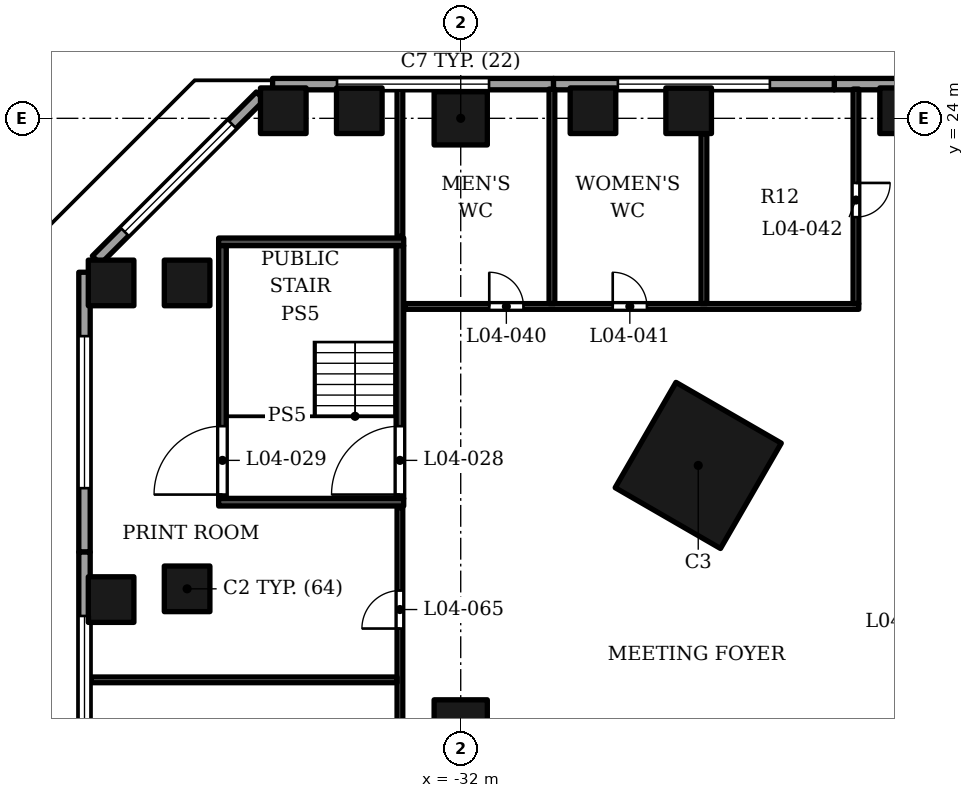
"""IFC4 building model, lengths in metres.
Left out: names, types, materials, properties, quantities, classifications, styles, units other than length and angle.
Written with IfcOpenShell. Run it as: python <this file> out.ifc"""

import sys

from ifc_helpers import new_model, si_unit, direction, frame, frame_2d, origin, origin_2d, place, context, subcontext, project, spatial, rectangle, extrude, element, fill, save


model = new_model("IFC4")
c1 = context("Model", 3, precision=1e-05, world=origin(), true_north=direction((0.0, 1.0)))
c2 = subcontext(c1, "Body", "Model", "MODEL_VIEW")
j1 = project(units=[si_unit("LENGTHUNIT", "METRE"), si_unit("PLANEANGLEUNIT", "RADIAN")], contexts=[c1])
p1 = place(None, origin())
s1 = spatial("IfcSite", under=j1, at=p1, CompositionType="ELEMENT")
p2 = place(p1, origin())
s2 = spatial("IfcBuilding", under=s1, at=p2, CompositionType="ELEMENT")
p3 = place(p2, frame((0.0, 0.0, 34.5)))
s3 = spatial("IfcBuildingStorey", under=s2, at=p3, CompositionType="ELEMENT", Elevation=34.5)
for number, where, z_axis, x_axis in (
    (1, (-32.0, 8.0, 0.0), (0.0, 0.0, 1.0), (1.0, 0.0, 0.0)),
    (2, (-32.0, 24.0, 0.0), (0.0, 0.0, 1.0), (1.0, 0.0, 0.0)),
):
    element("IfcColumn", number, at=place(p3, frame(where, z_axis=z_axis, x_axis=x_axis)), inside=s3, PredefinedType="COLUMN", context=c2, shape_type="SweptSolid", body=[
        extrude(rectangle(XDim=1.4, YDim=1.4, at=origin_2d()), origin(), (0.0, 0.0, 1.0), 5.5),
    ])
for number, where, z_axis, x_axis in (
    (3, (-39.2, 19.669, 0.0), (0.0, 0.0, 1.0), (1.0, 0.0, 0.0)),
    (4, (-34.669, 24.2, 0.0), (0.0, 0.0, 1.0), (1.0, 0.0, 0.0)),
    (5, (-39.2, 11.62, 0.0), (0.0, 0.0, 1.0), (1.0, 0.0, 0.0)),
    (6, (-26.002, 24.2, 0.0), (0.0, 0.0, 1.0), (1.0, 0.0, 0.0)),
    (7, (-41.2, 19.669, 0.0), (0.0, 0.0, 1.0), (1.0, 0.0, 0.0)),
    (8, (-36.669, 24.2, 0.0), (0.0, 0.0, 1.0), (1.0, 0.0, 0.0)),
    (9, (-41.2, 11.337, 0.0), (0.0, 0.0, 1.0), (1.0, 0.0, 0.0)),
    (10, (-28.52, 24.2, 0.0), (0.0, 0.0, 1.0), (1.0, 0.0, 0.0)),
    (11, (-20.372, 24.2, 0.0), (0.0, 0.0, 1.0), (1.0, 0.0, 0.0)),
):
    element("IfcColumn", number, at=place(p3, frame(where, z_axis=z_axis, x_axis=x_axis)), inside=s3, PredefinedType="COLUMN", context=c2, shape_type="SweptSolid", body=[
        extrude(rectangle(XDim=1.2, YDim=1.2, at=origin_2d()), origin(), (0.0, 0.0, 1.0), 5.5),
    ])
p4 = place(p3, frame((-25.75, 14.867, 0.0), z_axis=(0.0, 0.0, 1.0), x_axis=(0.866025386331, -0.50000003023, 0.0)))
e12 = element("IfcColumn", 12, at=p4, inside=s3, PredefinedType="COLUMN", context=c2, shape_type="SweptSolid", body=[
    extrude(rectangle(XDim=3.2, YDim=3.2, at=origin_2d()), origin(), (0.0, 0.0, 1.0), 5.5),
])
p5 = place(p3, frame((-14.78, 24.9, 0.0), z_axis=(0.0, 0.0, 1.0), x_axis=(-1.0, 0.0, 0.0)))
e13 = element("IfcWall", 13, at=p5, inside=s3, PredefinedType="SOLIDWALL", context=c2, shape_type="SweptSolid", body=[
    extrude(rectangle(XDim=7.39, YDim=0.3, at=frame_2d((3.695, 0.0))), origin(), (0.0, 0.0, 1.0), 4.1),
])
p6 = place(p5, frame((1.695, 0.0, 1.0)))
e14 = element("IfcOpeningElement", 14, at=p6, cuts=e13, PredefinedType="OPENING", context=c2, shape_type="SweptSolid", body=[
    extrude(rectangle(XDim=4.0, YDim=1.8, at=frame_2d((2.0, 0.9))), frame((0.0, 0.16, 0.0), z_axis=(0.0, -1.0, 0.0), x_axis=(1.0, 0.0, 0.0)), (0.0, 0.0, 1.0), 0.32),
])
p7 = place(p3, frame((-22.17, 24.9, 0.0), z_axis=(0.0, 0.0, 1.0), x_axis=(-1.0, 0.0, 0.0)))
e15 = element("IfcWall", 15, at=p7, inside=s3, PredefinedType="SOLIDWALL", context=c2, shape_type="SweptSolid", body=[
    extrude(rectangle(XDim=7.39, YDim=0.3, at=frame_2d((3.695, 0.0))), origin(), (0.0, 0.0, 1.0), 4.1),
])
p8 = place(p7, frame((1.695, 0.0, 1.0)))
e16 = element("IfcOpeningElement", 16, at=p8, cuts=e15, PredefinedType="OPENING", context=c2, shape_type="SweptSolid", body=[
    extrude(rectangle(XDim=4.0, YDim=1.8, at=frame_2d((2.0, 0.9))), frame((0.0, 0.16, 0.0), z_axis=(0.0, -1.0, 0.0), x_axis=(1.0, 0.0, 0.0)), (0.0, 0.0, 1.0), 0.32),
])
p9 = place(p3, frame((-29.56, 24.9, 0.0), z_axis=(0.0, 0.0, 1.0), x_axis=(-1.0, 0.0, 0.0)))
e17 = element("IfcWall", 17, at=p9, inside=s3, PredefinedType="SOLIDWALL", context=c2, shape_type="SweptSolid", body=[
    extrude(rectangle(XDim=7.39, YDim=0.3, at=frame_2d((3.695, 0.0))), origin(), (0.0, 0.0, 1.0), 4.1),
])
p10 = place(p9, frame((1.695, 0.0, 1.0)))
e18 = element("IfcOpeningElement", 18, at=p10, cuts=e17, PredefinedType="OPENING", context=c2, shape_type="SweptSolid", body=[
    extrude(rectangle(XDim=4.0, YDim=1.8, at=frame_2d((2.0, 0.9))), frame((0.0, 0.16, 0.0), z_axis=(0.0, -1.0, 0.0), x_axis=(1.0, 0.0, 0.0)), (0.0, 0.0, 1.0), 0.32),
])
p11 = place(p3, frame((-37.271, 24.588, 0.0), z_axis=(0.0, 0.0, 1.0), x_axis=(-0.707106781187, -0.707106781187, 0.0)))
e19 = element("IfcWall", 19, at=p11, inside=s3, PredefinedType="SOLIDWALL", context=c2, shape_type="SweptSolid", body=[
    extrude(rectangle(XDim=6.105, YDim=0.3, at=frame_2d((3.052, 0.0))), origin(), (0.0, 0.0, 1.0), 4.1),
])
p12 = place(p11, frame((1.052, 0.0, 1.0)))
e20 = element("IfcOpeningElement", 20, at=p12, cuts=e19, PredefinedType="OPENING", context=c2, shape_type="SweptSolid", body=[
    extrude(rectangle(XDim=4.0, YDim=1.8, at=frame_2d((2.0, 0.9))), frame((0.0, 0.16, 0.0), z_axis=(0.0, -1.0, 0.0), x_axis=(1.0, 0.0, 0.0)), (0.0, 0.0, 1.0), 0.32),
])
p13 = place(p3, frame((-41.9, 19.95, 0.0), z_axis=(0.0, 0.0, 1.0), x_axis=(0.0, -1.0, 0.0)))
e21 = element("IfcWall", 21, at=p13, inside=s3, PredefinedType="SOLIDWALL", context=c2, shape_type="SweptSolid", body=[
    extrude(rectangle(XDim=7.363, YDim=0.3, at=frame_2d((3.681, 0.0))), origin(), (0.0, 0.0, 1.0), 4.1),
])
p14 = place(p13, frame((1.681, 0.0, 1.0)))
e22 = element("IfcOpeningElement", 22, at=p14, cuts=e21, PredefinedType="OPENING", context=c2, shape_type="SweptSolid", body=[
    extrude(rectangle(XDim=4.0, YDim=1.8, at=frame_2d((2.0, 0.9))), frame((0.0, 0.16, 0.0), z_axis=(0.0, -1.0, 0.0), x_axis=(1.0, 0.0, 0.0)), (0.0, 0.0, 1.0), 0.32),
])
p15 = place(p3, frame((-41.9, 12.587, 0.0), z_axis=(0.0, 0.0, 1.0), x_axis=(0.0, -1.0, 0.0)))
e23 = element("IfcWall", 23, at=p15, inside=s3, PredefinedType="SOLIDWALL", context=c2, shape_type="SweptSolid", body=[
    extrude(rectangle(XDim=7.362, YDim=0.3, at=frame_2d((3.681, 0.0))), origin(), (0.0, 0.0, 1.0), 4.1),
])
p16 = place(p15, frame((1.681, 0.0, 1.0)))
e24 = element("IfcOpeningElement", 24, at=p16, cuts=e23, PredefinedType="OPENING", context=c2, shape_type="SweptSolid", body=[
    extrude(rectangle(XDim=4.0, YDim=1.8, at=frame_2d((2.0, 0.9))), frame((0.0, 0.16, 0.0), z_axis=(0.0, -1.0, 0.0), x_axis=(1.0, 0.0, 0.0)), (0.0, 0.0, 1.0), 0.32),
])
p17 = place(p3, frame((-35.75, 24.85, 5.5), z_axis=(0.0, 0.0, 1.0), x_axis=(-1.0, 0.0, 0.0)))
e25 = element("IfcWall", 25, at=p17, inside=s3, PredefinedType="PARAPET", context=c2, shape_type="SweptSolid", body=[
    extrude(rectangle(XDim=1.25, YDim=0.3, at=frame_2d((0.625, 0.0))), origin(), (0.0, 0.0, 1.0), 1.1),
])
p18 = place(p3, frame((-37.042, 24.745, 5.5), z_axis=(0.0, 0.0, 1.0), x_axis=(-0.707124572946, -0.70708898898, 0.0)))
e26 = element("IfcWall", 26, at=p18, inside=s3, PredefinedType="PARAPET", context=c2, shape_type="SweptSolid", body=[
    extrude(rectangle(XDim=6.861, YDim=0.3, at=frame_2d((3.431, 0.0))), origin(), (0.0, 0.0, 1.0), 1.1),
])
p19 = place(p3, frame((-41.85, 19.79, 5.5), z_axis=(0.0, 0.0, 1.0), x_axis=(0.0, -1.0, 0.0)))
e27 = element("IfcWall", 27, at=p19, inside=s3, PredefinedType="PARAPET", context=c2, shape_type="SweptSolid", body=[
    extrude(rectangle(XDim=14.698, YDim=0.3, at=frame_2d((7.349, 0.0))), origin(), (0.0, 0.0, 1.0), 1.1),
])
for number, where, z_axis, x_axis in (
    (28, (-38.37, 13.9, 0.0), (0.0, 0.0, 1.0), (1.0, 0.0, 0.0)),
    (29, (-38.37, 20.75, 0.0), (0.0, 0.0, 1.0), (1.0, 0.0, 0.0)),
):
    element("IfcWall", number, at=place(p3, frame(where, z_axis=z_axis, x_axis=x_axis)), inside=s3, PredefinedType="SOLIDWALL", context=c2, shape_type="SweptSolid", body=[
        extrude(rectangle(XDim=4.87, YDim=0.2, at=frame_2d((2.435, 0.0))), origin(), (0.0, 0.0, 1.0), 5.05),
    ])
p20 = place(p3, frame((-38.27, 14.0, 0.0), z_axis=(0.0, 0.0, 1.0), x_axis=(0.0, 1.0, 0.0)))
e30 = element("IfcWall", 30, at=p20, inside=s3, PredefinedType="SOLIDWALL", context=c2, shape_type="SweptSolid", body=[
    extrude(rectangle(XDim=6.65, YDim=0.2, at=frame_2d((3.325, 0.0))), origin(), (0.0, 0.0, 1.0), 5.05),
])
p21 = place(p20, frame((0.1, 0.0, 0.0)))
e31 = element("IfcOpeningElement", 31, at=p21, cuts=e30, PredefinedType="OPENING", context=c2, shape_type="SweptSolid", body=[
    extrude(rectangle(XDim=1.8, YDim=2.4, at=frame_2d((0.9, 1.2))), frame((0.0, 0.11, 0.0), z_axis=(0.0, -1.0, 0.0), x_axis=(1.0, 0.0, 0.0)), (0.0, 0.0, 1.0), 0.22),
])
p22 = place(p3, frame((-33.6, 14.0, 0.0), z_axis=(0.0, 0.0, 1.0), x_axis=(0.0, 1.0, 0.0)))
e32 = element("IfcWall", 32, at=p22, inside=s3, PredefinedType="SOLIDWALL", context=c2, shape_type="SweptSolid", body=[
    extrude(rectangle(XDim=6.65, YDim=0.2, at=frame_2d((3.325, 0.0))), origin(), (0.0, 0.0, 1.0), 5.05),
])
p23 = place(p22, frame((0.1, 0.0, 0.0)))
e33 = element("IfcOpeningElement", 33, at=p23, cuts=e32, PredefinedType="OPENING", context=c2, shape_type="SweptSolid", body=[
    extrude(rectangle(XDim=1.8, YDim=2.4, at=frame_2d((0.9, 1.2))), frame((0.0, 0.11, 0.0), z_axis=(0.0, -1.0, 0.0), x_axis=(1.0, 0.0, 0.0)), (0.0, 0.0, 1.0), 0.22),
])
p24 = place(p3, frame((-33.6, 4.69, 0.0), z_axis=(0.0, 0.0, 1.0), x_axis=(0.0, 1.0, 0.0)))
e34 = element("IfcWall", 34, at=p24, inside=s3, PredefinedType="PARTITIONING", context=c2, shape_type="SweptSolid", body=[
    extrude(rectangle(XDim=9.07, YDim=0.15, at=frame_2d((4.535, 0.0))), origin(), (0.0, 0.0, 1.0), 3.85),
])
p25 = place(p24, frame((0.261, 0.0, 0.0)))
e35 = element("IfcOpeningElement", 35, at=p25, cuts=e34, PredefinedType="OPENING", context=c2, shape_type="SweptSolid", body=[
    extrude(rectangle(XDim=1.0, YDim=2.1, at=frame_2d((0.5, 1.05))), frame((0.0, 0.085, 0.0), z_axis=(0.0, -1.0, 0.0), x_axis=(1.0, 0.0, 0.0)), (0.0, 0.0, 1.0), 0.17),
])
p26 = place(p24, frame((5.885, 0.0, 0.0)))
e36 = element("IfcOpeningElement", 36, at=p26, cuts=e34, PredefinedType="OPENING", context=c2, shape_type="SweptSolid", body=[
    extrude(rectangle(XDim=1.0, YDim=2.1, at=frame_2d((0.5, 1.05))), frame((0.0, 0.085, 0.0), z_axis=(0.0, -1.0, 0.0), x_axis=(1.0, 0.0, 0.0)), (0.0, 0.0, 1.0), 0.17),
])
p27 = place(p3, frame((-41.72, 9.225, 0.0), z_axis=(0.0, 0.0, 1.0), x_axis=(1.0, 0.0, 0.0)))
e37 = element("IfcWall", 37, at=p27, inside=s3, PredefinedType="PARTITIONING", context=c2, shape_type="SweptSolid", body=[
    extrude(rectangle(XDim=8.045, YDim=0.15, at=frame_2d((4.022, 0.0))), origin(), (0.0, 0.0, 1.0), 4.15),
])
p28 = place(p3, frame((-33.46, 19.05, 0.0), z_axis=(0.0, 0.0, 1.0), x_axis=(1.0, 0.0, 0.0)))
e38 = element("IfcWall", 38, at=p28, inside=s3, PredefinedType="PARTITIONING", context=c2, shape_type="SweptSolid", body=[
    extrude(rectangle(XDim=11.935, YDim=0.15, at=frame_2d((5.968, 0.0))), origin(), (0.0, 0.0, 1.0), 3.85),
])
p29 = place(p28, frame((2.211, 0.0, 0.0)))
e39 = element("IfcOpeningElement", 39, at=p29, cuts=e38, PredefinedType="OPENING", context=c2, shape_type="SweptSolid", body=[
    extrude(rectangle(XDim=0.9, YDim=2.1, at=frame_2d((0.45, 1.05))), frame((0.0, 0.085, 0.0), z_axis=(0.0, -1.0, 0.0), x_axis=(1.0, 0.0, 0.0)), (0.0, 0.0, 1.0), 0.17),
])
p30 = place(p28, frame((5.46, 0.0, 0.0)))
e40 = element("IfcOpeningElement", 40, at=p30, cuts=e38, PredefinedType="OPENING", context=c2, shape_type="SweptSolid", body=[
    extrude(rectangle(XDim=0.9, YDim=2.1, at=frame_2d((0.45, 1.05))), frame((0.0, 0.085, 0.0), z_axis=(0.0, -1.0, 0.0), x_axis=(1.0, 0.0, 0.0)), (0.0, 0.0, 1.0), 0.17),
])
p31 = place(p3, frame((-29.6, 19.125, 0.0), z_axis=(0.0, 0.0, 1.0), x_axis=(0.0, 1.0, 0.0)))
e41 = element("IfcWall", 41, at=p31, inside=s3, PredefinedType="PARTITIONING", context=c2, shape_type="SweptSolid", body=[
    extrude(rectangle(XDim=5.645, YDim=0.15, at=frame_2d((2.823, 0.0))), origin(), (0.0, 0.0, 1.0), 3.85),
])
p32 = place(p3, frame((-25.6, 19.125, 0.0), z_axis=(0.0, 0.0, 1.0), x_axis=(0.0, 1.0, 0.0)))
e42 = element("IfcWall", 42, at=p32, inside=s3, PredefinedType="PARTITIONING", context=c2, shape_type="SweptSolid", body=[
    extrude(rectangle(XDim=4.475, YDim=0.15, at=frame_2d((2.238, 0.0))), origin(), (0.0, 0.0, 1.0), 5.05),
])
p33 = place(p3, frame((-21.6, 19.125, 0.0), z_axis=(0.0, 0.0, 1.0), x_axis=(0.0, 1.0, 0.0)))
e43 = element("IfcWall", 43, at=p33, inside=s3, PredefinedType="PARTITIONING", context=c2, shape_type="SweptSolid", body=[
    extrude(rectangle(XDim=5.645, YDim=0.15, at=frame_2d((2.823, 0.0))), origin(), (0.0, 0.0, 1.0), 3.85),
])
p34 = place(p33, frame((2.275, 0.0, 0.0)))
e44 = element("IfcOpeningElement", 44, at=p34, cuts=e43, PredefinedType="OPENING", context=c2, shape_type="SweptSolid", body=[
    extrude(rectangle(XDim=0.9, YDim=2.1, at=frame_2d((0.45, 1.05))), frame((0.0, 0.085, 0.0), z_axis=(0.0, -1.0, 0.0), x_axis=(1.0, 0.0, 0.0)), (0.0, 0.0, 1.0), 0.17),
])
p35 = place(p3, frame((-33.6, 20.89, 0.0), z_axis=(0.0, 0.0, 1.0), x_axis=(0.0, 1.0, 0.0)))
e45 = element("IfcWall", 45, at=p35, inside=s3, PredefinedType="PARTITIONING", context=c2, shape_type="SweptSolid", body=[
    extrude(rectangle(XDim=3.88, YDim=0.15, at=frame_2d((1.94, 0.0))), origin(), (0.0, 0.0, 1.0), 5.05),
])
p36 = place(p8, origin())
e46 = element("IfcWindow", 46, at=p36, inside=s3, PartitioningType="SINGLE_PANEL", PredefinedType="WINDOW", context=c2, shape_type="SweptSolid", body=[
    extrude(rectangle(XDim=4.0, YDim=1.8, at=frame_2d((2.0, 0.9))), frame((0.0, 0.03, 0.0), z_axis=(0.0, -1.0, 0.0), x_axis=(1.0, 0.0, 0.0)), (0.0, 0.0, 1.0), 0.06),
])
fill(e16, e46)
p37 = place(p10, origin())
e47 = element("IfcWindow", 47, at=p37, inside=s3, PartitioningType="SINGLE_PANEL", PredefinedType="WINDOW", context=c2, shape_type="SweptSolid", body=[
    extrude(rectangle(XDim=4.0, YDim=1.8, at=frame_2d((2.0, 0.9))), frame((0.0, 0.03, 0.0), z_axis=(0.0, -1.0, 0.0), x_axis=(1.0, 0.0, 0.0)), (0.0, 0.0, 1.0), 0.06),
])
fill(e18, e47)
p38 = place(p12, origin())
e48 = element("IfcWindow", 48, at=p38, inside=s3, PartitioningType="SINGLE_PANEL", PredefinedType="WINDOW", context=c2, shape_type="SweptSolid", body=[
    extrude(rectangle(XDim=4.0, YDim=1.8, at=frame_2d((2.0, 0.9))), frame((0.0, 0.03, 0.0), z_axis=(0.0, -1.0, 0.0), x_axis=(1.0, 0.0, 0.0)), (0.0, 0.0, 1.0), 0.06),
])
fill(e20, e48)
p39 = place(p14, origin())
e49 = element("IfcWindow", 49, at=p39, inside=s3, PartitioningType="SINGLE_PANEL", PredefinedType="WINDOW", context=c2, shape_type="SweptSolid", body=[
    extrude(rectangle(XDim=4.0, YDim=1.8, at=frame_2d((2.0, 0.9))), frame((0.0, 0.03, 0.0), z_axis=(0.0, -1.0, 0.0), x_axis=(1.0, 0.0, 0.0)), (0.0, 0.0, 1.0), 0.06),
])
fill(e22, e49)
p40 = place(p16, origin())
e50 = element("IfcWindow", 50, at=p40, inside=s3, PartitioningType="SINGLE_PANEL", PredefinedType="WINDOW", context=c2, shape_type="SweptSolid", body=[
    extrude(rectangle(XDim=4.0, YDim=1.8, at=frame_2d((2.0, 0.9))), frame((0.0, 0.03, 0.0), z_axis=(0.0, -1.0, 0.0), x_axis=(1.0, 0.0, 0.0)), (0.0, 0.0, 1.0), 0.06),
])
fill(e24, e50)
p41 = place(p23, origin())
e51 = element("IfcDoor", 51, at=p41, inside=s3, OperationType="DOUBLE_DOOR_SINGLE_SWING", PredefinedType="DOOR", context=c2, shape_type="SweptSolid", body=[
    extrude(rectangle(XDim=1.8, YDim=2.4, at=frame_2d((0.9, 1.2))), frame((0.0, 0.025, 0.0), z_axis=(0.0, -1.0, 0.0), x_axis=(1.0, 0.0, 0.0)), (0.0, 0.0, 1.0), 0.05),
])
fill(e33, e51)
p42 = place(p21, origin())
e52 = element("IfcDoor", 52, at=p42, inside=s3, OperationType="DOUBLE_DOOR_SINGLE_SWING", PredefinedType="DOOR", context=c2, shape_type="SweptSolid", body=[
    extrude(rectangle(XDim=1.8, YDim=2.4, at=frame_2d((0.9, 1.2))), frame((0.0, 0.025, 0.0), z_axis=(0.0, -1.0, 0.0), x_axis=(1.0, 0.0, 0.0)), (0.0, 0.0, 1.0), 0.05),
])
fill(e31, e52)
p43 = place(p29, origin())
e53 = element("IfcDoor", 53, at=p43, inside=s3, OperationType="SINGLE_SWING_LEFT", PredefinedType="DOOR", context=c2, shape_type="SweptSolid", body=[
    extrude(rectangle(XDim=0.9, YDim=2.1, at=frame_2d((0.45, 1.05))), frame((0.0, 0.025, 0.0), z_axis=(0.0, -1.0, 0.0), x_axis=(1.0, 0.0, 0.0)), (0.0, 0.0, 1.0), 0.05),
])
fill(e39, e53)
p44 = place(p30, origin())
e54 = element("IfcDoor", 54, at=p44, inside=s3, OperationType="SINGLE_SWING_LEFT", PredefinedType="DOOR", context=c2, shape_type="SweptSolid", body=[
    extrude(rectangle(XDim=0.9, YDim=2.1, at=frame_2d((0.45, 1.05))), frame((0.0, 0.025, 0.0), z_axis=(0.0, -1.0, 0.0), x_axis=(1.0, 0.0, 0.0)), (0.0, 0.0, 1.0), 0.05),
])
fill(e40, e54)
p45 = place(p34, origin())
e55 = element("IfcDoor", 55, at=p45, inside=s3, OperationType="SINGLE_SWING_RIGHT", PredefinedType="DOOR", context=c2, shape_type="SweptSolid", body=[
    extrude(rectangle(XDim=0.9, YDim=2.1, at=frame_2d((0.45, 1.05))), frame((0.0, 0.025, 0.0), z_axis=(0.0, -1.0, 0.0), x_axis=(1.0, 0.0, 0.0)), (0.0, 0.0, 1.0), 0.05),
])
fill(e44, e55)
p46 = place(p26, origin())
e56 = element("IfcDoor", 56, at=p46, inside=s3, OperationType="SINGLE_SWING_LEFT", PredefinedType="DOOR", context=c2, shape_type="SweptSolid", body=[
    extrude(rectangle(XDim=1.0, YDim=2.1, at=frame_2d((0.5, 1.05))), frame((0.0, 0.025, 0.0), z_axis=(0.0, -1.0, 0.0), x_axis=(1.0, 0.0, 0.0)), (0.0, 0.0, 1.0), 0.05),
])
fill(e36, e56)
save(model, sys.argv[1])
